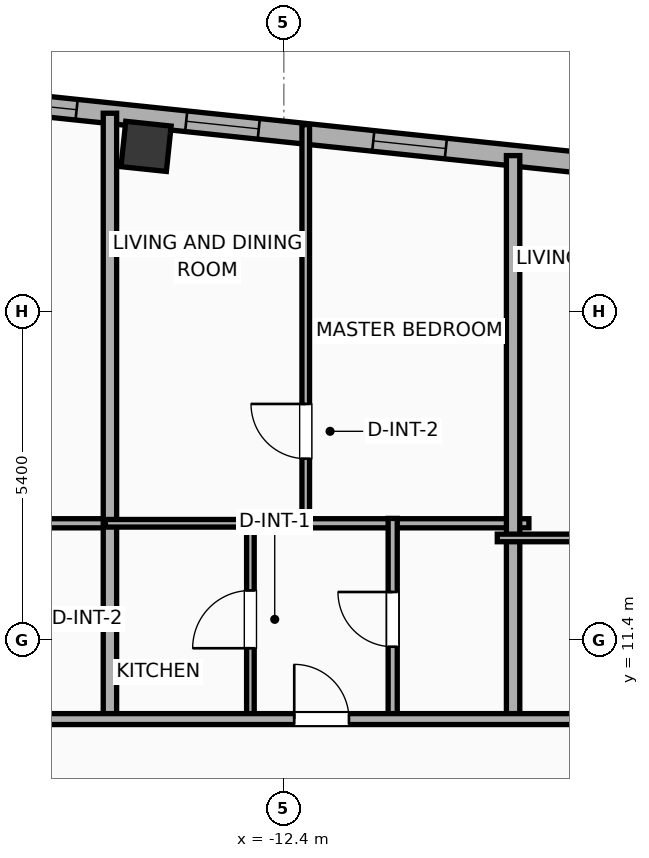
"""IFC4 building model, lengths in metres.
Left out: names, types, materials, properties, quantities, classifications, styles, units other than length and angle.
Written with IfcOpenShell. Run it as: python <this file> out.ifc"""

import sys

from ifc_helpers import new_model, si_unit, direction, frame, frame_2d, origin, origin_2d, place, context, subcontext, project, spatial, rectangle, hollow_rectangle, extrude, element, fill, save


model = new_model("IFC4")
c1 = context("Model", 3, precision=1e-05, world=origin(), true_north=direction((0.0, 1.0)))
c2 = subcontext(c1, "Body", "Model", "MODEL_VIEW")
j1 = project(units=[si_unit("LENGTHUNIT", "METRE"), si_unit("PLANEANGLEUNIT", "RADIAN")], contexts=[c1])
p1 = place(None, origin())
s1 = spatial("IfcSite", under=j1, at=p1, CompositionType="ELEMENT")
p2 = place(p1, origin())
s2 = spatial("IfcBuilding", under=s1, at=p2, CompositionType="ELEMENT")
p3 = place(p2, frame((0.0, 0.0, 271.7)))
s3 = spatial("IfcBuildingStorey", under=s2, at=p3, CompositionType="ELEMENT", Elevation=271.7)
p4 = place(p3, frame((-14.666, 19.518, 0.0), z_axis=(0.0, 0.0, 1.0), x_axis=(0.994521895368, -0.104528463268, 0.0)))
e1 = element("IfcColumn", 1, at=p4, inside=s3, PredefinedType="COLUMN", context=c2, shape_type="SweptSolid", body=[
    extrude(hollow_rectangle(XDim=0.75, YDim=0.75, WallThickness=0.025, at=origin_2d()), origin(), (0.0, 0.0, 1.0), 3.9),
])
p5 = place(p3, frame((-23.908, 20.972, 0.0), z_axis=(0.0, 0.0, 1.0), x_axis=(0.994521888554, -0.104528528102, 0.0)))
e2 = element("IfcWall", 2, at=p5, inside=s3, PredefinedType="ELEMENTEDWALL", context=c2, shape_type="SweptSolid", body=[
    extrude(rectangle(XDim=46.766, YDim=0.34, at=frame_2d((23.383, 0.0))), origin(), (0.0, 0.0, 1.0), 3.65),
])
p6 = place(p5, frame((5.744, 0.0, 0.75)))
e3 = element("IfcOpeningElement", 3, at=p6, cuts=e2, PredefinedType="OPENING", context=c2, shape_type="SweptSolid", body=[
    extrude(rectangle(XDim=2.4, YDim=2.1, at=frame_2d((1.2, 1.05))), frame((0.0, 0.18, 0.0), z_axis=(0.0, -1.0, 0.0), x_axis=(1.0, 0.0, 0.0)), (0.0, 0.0, 1.0), 0.36),
])
p7 = place(p5, frame((3.05, 0.0, 0.75)))
e4 = element("IfcOpeningElement", 4, at=p7, cuts=e2, PredefinedType="OPENING", context=c2, shape_type="SweptSolid", body=[
    extrude(rectangle(XDim=1.2, YDim=2.05, at=frame_2d((0.6, 1.025))), frame((0.0, 0.18, 0.0), z_axis=(0.0, -1.0, 0.0), x_axis=(1.0, 0.0, 0.0)), (0.0, 0.0, 1.0), 0.36),
])
p8 = place(p5, frame((9.957, 0.0, 0.75)))
e5 = element("IfcOpeningElement", 5, at=p8, cuts=e2, PredefinedType="OPENING", context=c2, shape_type="SweptSolid", body=[
    extrude(rectangle(XDim=1.2, YDim=2.05, at=frame_2d((0.6, 1.025))), frame((0.0, 0.18, 0.0), z_axis=(0.0, -1.0, 0.0), x_axis=(1.0, 0.0, 0.0)), (0.0, 0.0, 1.0), 0.36),
])
p9 = place(p5, frame((13.05, 0.0, 0.75)))
e6 = element("IfcOpeningElement", 6, at=p9, cuts=e2, PredefinedType="OPENING", context=c2, shape_type="SweptSolid", body=[
    extrude(rectangle(XDim=1.2, YDim=2.05, at=frame_2d((0.6, 1.025))), frame((0.0, 0.18, 0.0), z_axis=(0.0, -1.0, 0.0), x_axis=(1.0, 0.0, 0.0)), (0.0, 0.0, 1.0), 0.36),
])
p10 = place(p5, frame((16.383, 0.0, 0.75)))
e7 = element("IfcOpeningElement", 7, at=p10, cuts=e2, PredefinedType="OPENING", context=c2, shape_type="SweptSolid", body=[
    extrude(rectangle(XDim=1.2, YDim=2.05, at=frame_2d((0.6, 1.025))), frame((0.0, 0.18, 0.0), z_axis=(0.0, -1.0, 0.0), x_axis=(1.0, 0.0, 0.0)), (0.0, 0.0, 1.0), 0.36),
])
p11 = place(p5, frame((19.716, 0.0, 0.75)))
e8 = element("IfcOpeningElement", 8, at=p11, cuts=e2, PredefinedType="OPENING", context=c2, shape_type="SweptSolid", body=[
    extrude(rectangle(XDim=1.2, YDim=2.05, at=frame_2d((0.6, 1.025))), frame((0.0, 0.18, 0.0), z_axis=(0.0, -1.0, 0.0), x_axis=(1.0, 0.0, 0.0)), (0.0, 0.0, 1.0), 0.36),
])
p12 = place(p5, frame((23.195, 0.0, 0.75)))
e9 = element("IfcOpeningElement", 9, at=p12, cuts=e2, PredefinedType="OPENING", context=c2, shape_type="SweptSolid", body=[
    extrude(rectangle(XDim=1.2, YDim=2.05, at=frame_2d((0.6, 1.025))), frame((0.0, 0.18, 0.0), z_axis=(0.0, -1.0, 0.0), x_axis=(1.0, 0.0, 0.0)), (0.0, 0.0, 1.0), 0.36),
])
p13 = place(p5, frame((26.194, 0.0, 0.75)))
e10 = element("IfcOpeningElement", 10, at=p13, cuts=e2, PredefinedType="OPENING", context=c2, shape_type="SweptSolid", body=[
    extrude(rectangle(XDim=1.2, YDim=2.05, at=frame_2d((0.6, 1.025))), frame((0.0, 0.18, 0.0), z_axis=(0.0, -1.0, 0.0), x_axis=(1.0, 0.0, 0.0)), (0.0, 0.0, 1.0), 0.36),
])
p14 = place(p5, frame((30.152, 0.0, 0.75)))
e11 = element("IfcOpeningElement", 11, at=p14, cuts=e2, PredefinedType="OPENING", context=c2, shape_type="SweptSolid", body=[
    extrude(rectangle(XDim=1.2, YDim=2.05, at=frame_2d((0.6, 1.025))), frame((0.0, 0.18, 0.0), z_axis=(0.0, -1.0, 0.0), x_axis=(1.0, 0.0, 0.0)), (0.0, 0.0, 1.0), 0.36),
])
p15 = place(p5, frame((33.631, 0.0, 0.75)))
e12 = element("IfcOpeningElement", 12, at=p15, cuts=e2, PredefinedType="OPENING", context=c2, shape_type="SweptSolid", body=[
    extrude(rectangle(XDim=1.2, YDim=2.05, at=frame_2d((0.6, 1.025))), frame((0.0, 0.18, 0.0), z_axis=(0.0, -1.0, 0.0), x_axis=(1.0, 0.0, 0.0)), (0.0, 0.0, 1.0), 0.36),
])
p16 = place(p5, frame((38.07, 0.0, 0.75)))
e13 = element("IfcOpeningElement", 13, at=p16, cuts=e2, PredefinedType="OPENING", context=c2, shape_type="SweptSolid", body=[
    extrude(rectangle(XDim=1.2, YDim=2.05, at=frame_2d((0.6, 1.025))), frame((0.0, 0.18, 0.0), z_axis=(0.0, -1.0, 0.0), x_axis=(1.0, 0.0, 0.0)), (0.0, 0.0, 1.0), 0.36),
])
p17 = place(p5, frame((40.589, 0.0, 0.75)))
e14 = element("IfcOpeningElement", 14, at=p17, cuts=e2, PredefinedType="OPENING", context=c2, shape_type="SweptSolid", body=[
    extrude(rectangle(XDim=1.2, YDim=2.05, at=frame_2d((0.6, 1.025))), frame((0.0, 0.18, 0.0), z_axis=(0.0, -1.0, 0.0), x_axis=(1.0, 0.0, 0.0)), (0.0, 0.0, 1.0), 0.36),
])
p18 = place(p5, frame((43.789, 0.0, 0.75)))
e15 = element("IfcOpeningElement", 15, at=p18, cuts=e2, PredefinedType="OPENING", context=c2, shape_type="SweptSolid", body=[
    extrude(rectangle(XDim=1.2, YDim=2.05, at=frame_2d((0.6, 1.025))), frame((0.0, 0.18, 0.0), z_axis=(0.0, -1.0, 0.0), x_axis=(1.0, 0.0, 0.0)), (0.0, 0.0, 1.0), 0.36),
])
p19 = place(p3, frame((-18.79, 13.32, 0.0), z_axis=(0.0, 0.0, 1.0), x_axis=(1.0, 0.0, 0.0)))
e16 = element("IfcWall", 16, at=p19, inside=s3, PredefinedType="PLUMBINGWALL", context=c2, shape_type="SweptSolid", body=[
    extrude(rectangle(XDim=3.605, YDim=0.15, at=frame_2d((1.802, 0.0))), origin(), (0.0, 0.0, 1.0), 3.65),
])
p20 = place(p3, frame((-15.26, 10.02, 0.0), z_axis=(0.0, 0.0, 1.0), x_axis=(0.0, 1.0, 0.0)))
e17 = element("IfcWall", 17, at=p20, inside=s3, PredefinedType="PARTITIONING", context=c2, shape_type="SweptSolid", body=[
    extrude(rectangle(XDim=10.043, YDim=0.22, at=frame_2d((5.021, 0.0))), origin(), (0.0, 0.0, 1.0), 3.09),
])
p21 = place(p3, frame((-12.04, 13.24, 0.0), z_axis=(0.0, 0.0, 1.0), x_axis=(0.0, 1.0, 0.0)))
e18 = element("IfcWall", 18, at=p21, inside=s3, PredefinedType="PARTITIONING", context=c2, shape_type="SweptSolid", body=[
    extrude(rectangle(XDim=6.635, YDim=0.125, at=frame_2d((3.318, 0.0))), origin(), (0.0, 0.0, 1.0), 3.65),
])
p22 = place(p21, frame((1.143, 0.0, 0.0)))
e19 = element("IfcOpeningElement", 19, at=p22, cuts=e18, PredefinedType="OPENING", context=c2, shape_type="SweptSolid", body=[
    extrude(rectangle(XDim=0.9, YDim=2.05, at=frame_2d((0.45, 1.025))), frame((0.0, 0.073, 0.0), z_axis=(0.0, -1.0, 0.0), x_axis=(1.0, 0.0, 0.0)), (0.0, 0.0, 1.0), 0.145),
])
p23 = place(p3, frame((-12.16, 13.32, 0.0), z_axis=(0.0, 0.0, 1.0), x_axis=(1.0, 0.0, 0.0)))
e20 = element("IfcWall", 20, at=p23, inside=s3, PredefinedType="PLUMBINGWALL", context=c2, shape_type="SweptSolid", body=[
    extrude(rectangle(XDim=3.79, YDim=0.15, at=frame_2d((1.895, 0.0))), origin(), (0.0, 0.0, 1.0), 3.65),
])
p24 = place(p3, frame((-12.95, 10.08, 0.0), z_axis=(0.0, 0.0, 1.0), x_axis=(0.0, 1.0, 0.0)))
e21 = element("IfcWall", 21, at=p24, inside=s3, PredefinedType="PARTITIONING", context=c2, shape_type="SweptSolid", body=[
    extrude(rectangle(XDim=3.32, YDim=0.125, at=frame_2d((1.66, 0.0))), origin(), (0.0, 0.0, 1.0), 3.65),
])
p25 = place(p24, frame((1.185, 0.0, 0.0)))
e22 = element("IfcOpeningElement", 22, at=p25, cuts=e21, PredefinedType="OPENING", context=c2, shape_type="SweptSolid", body=[
    extrude(rectangle(XDim=0.95, YDim=2.05, at=frame_2d((0.475, 1.025))), frame((0.0, 0.073, 0.0), z_axis=(0.0, -1.0, 0.0), x_axis=(1.0, 0.0, 0.0)), (0.0, 0.0, 1.0), 0.145),
])
p26 = place(p3, frame((-15.335, 13.32, 0.0), z_axis=(0.0, 0.0, 1.0), x_axis=(1.0, 0.0, 0.0)))
e23 = element("IfcWall", 23, at=p26, inside=s3, PredefinedType="PARTITIONING", context=c2, shape_type="SweptSolid", body=[
    extrude(rectangle(XDim=2.505, YDim=0.125, at=frame_2d((1.252, 0.0))), origin(), (0.0, 0.0, 1.0), 3.65),
])
p27 = place(p3, frame((-10.61, 10.08, 0.0), z_axis=(0.0, 0.0, 1.0), x_axis=(0.0, 1.0, 0.0)))
e24 = element("IfcWall", 24, at=p27, inside=s3, PredefinedType="PLUMBINGWALL", context=c2, shape_type="SweptSolid", body=[
    extrude(rectangle(XDim=3.32, YDim=0.15, at=frame_2d((1.66, 0.0))), origin(), (0.0, 0.0, 1.0), 3.65),
])
p28 = place(p27, frame((1.21, 0.0, 0.0)))
e25 = element("IfcOpeningElement", 25, at=p28, cuts=e24, PredefinedType="OPENING", context=c2, shape_type="SweptSolid", body=[
    extrude(rectangle(XDim=0.9, YDim=2.05, at=frame_2d((0.45, 1.025))), frame((0.0, 0.085, 0.0), z_axis=(0.0, -1.0, 0.0), x_axis=(1.0, 0.0, 0.0)), (0.0, 0.0, 1.0), 0.17),
])
p29 = place(p3, frame((-8.63, 10.02, 0.0), z_axis=(0.0, 0.0, 1.0), x_axis=(0.0, 1.0, 0.0)))
e26 = element("IfcWall", 26, at=p29, inside=s3, PredefinedType="PARTITIONING", context=c2, shape_type="SweptSolid", body=[
    extrude(rectangle(XDim=9.346, YDim=0.22, at=frame_2d((4.673, 0.0))), origin(), (0.0, 0.0, 1.0), 3.65),
])
p30 = place(p3, frame((-8.89, 13.079, 0.0), z_axis=(0.0, 0.0, 1.0), x_axis=(1.0, 0.0, 0.0)))
e27 = element("IfcWall", 27, at=p30, inside=s3, PredefinedType="PARTITIONING", context=c2, shape_type="SweptSolid", body=[
    extrude(rectangle(XDim=2.69, YDim=0.125, at=frame_2d((1.345, 0.0))), origin(), (0.0, 0.0, 1.0), 3.65),
])
p31 = place(p3, frame((-28.516, 10.1, 0.0), z_axis=(0.0, 0.0, 1.0), x_axis=(1.0, 0.0, 0.0)))
e28 = element("IfcWall", 28, at=p31, inside=s3, PredefinedType="PARTITIONING", context=c2, shape_type="SweptSolid", body=[
    extrude(rectangle(XDim=53.955, YDim=0.18, at=frame_2d((26.978, 0.0))), origin(), (0.0, 0.0, 1.0), 3.65),
])
p32 = place(p31, frame((2.998, 0.0, 0.0)))
e29 = element("IfcOpeningElement", 29, at=p32, cuts=e28, PredefinedType="OPENING", context=c2, shape_type="SweptSolid", body=[
    extrude(rectangle(XDim=0.9, YDim=2.05, at=frame_2d((0.45, 1.025))), frame((0.0, 0.1, 0.0), z_axis=(0.0, -1.0, 0.0), x_axis=(1.0, 0.0, 0.0)), (0.0, 0.0, 1.0), 0.2),
])
p33 = place(p31, frame((9.656, 0.0, 0.0)))
e30 = element("IfcOpeningElement", 30, at=p33, cuts=e28, PredefinedType="OPENING", context=c2, shape_type="SweptSolid", body=[
    extrude(rectangle(XDim=0.9, YDim=2.05, at=frame_2d((0.45, 1.025))), frame((0.0, 0.1, 0.0), z_axis=(0.0, -1.0, 0.0), x_axis=(1.0, 0.0, 0.0)), (0.0, 0.0, 1.0), 0.2),
])
p34 = place(p31, frame((16.287, 0.0, 0.0)))
e31 = element("IfcOpeningElement", 31, at=p34, cuts=e28, PredefinedType="OPENING", context=c2, shape_type="SweptSolid", body=[
    extrude(rectangle(XDim=0.9, YDim=2.05, at=frame_2d((0.45, 1.025))), frame((0.0, 0.1, 0.0), z_axis=(0.0, -1.0, 0.0), x_axis=(1.0, 0.0, 0.0)), (0.0, 0.0, 1.0), 0.2),
])
p35 = place(p31, frame((22.918, 0.0, 0.0)))
e32 = element("IfcOpeningElement", 32, at=p35, cuts=e28, PredefinedType="OPENING", context=c2, shape_type="SweptSolid", body=[
    extrude(rectangle(XDim=0.9, YDim=2.05, at=frame_2d((0.45, 1.025))), frame((0.0, 0.1, 0.0), z_axis=(0.0, -1.0, 0.0), x_axis=(1.0, 0.0, 0.0)), (0.0, 0.0, 1.0), 0.2),
])
p36 = place(p31, frame((29.689, 0.0, 0.0)))
e33 = element("IfcOpeningElement", 33, at=p36, cuts=e28, PredefinedType="OPENING", context=c2, shape_type="SweptSolid", body=[
    extrude(rectangle(XDim=0.9, YDim=2.05, at=frame_2d((0.45, 1.025))), frame((0.0, 0.1, 0.0), z_axis=(0.0, -1.0, 0.0), x_axis=(1.0, 0.0, 0.0)), (0.0, 0.0, 1.0), 0.2),
])
p37 = place(p31, frame((36.612, 0.0, 0.0)))
e34 = element("IfcOpeningElement", 34, at=p37, cuts=e28, PredefinedType="OPENING", context=c2, shape_type="SweptSolid", body=[
    extrude(rectangle(XDim=0.9, YDim=2.05, at=frame_2d((0.45, 1.025))), frame((0.0, 0.1, 0.0), z_axis=(0.0, -1.0, 0.0), x_axis=(1.0, 0.0, 0.0)), (0.0, 0.0, 1.0), 0.2),
])
p38 = place(p31, frame((43.529, 0.0, 0.0)))
e35 = element("IfcOpeningElement", 35, at=p38, cuts=e28, PredefinedType="OPENING", context=c2, shape_type="SweptSolid", body=[
    extrude(rectangle(XDim=0.9, YDim=2.05, at=frame_2d((0.45, 1.025))), frame((0.0, 0.1, 0.0), z_axis=(0.0, -1.0, 0.0), x_axis=(1.0, 0.0, 0.0)), (0.0, 0.0, 1.0), 0.2),
])
p39 = place(p31, frame((50.452, 0.0, 0.0)))
e36 = element("IfcOpeningElement", 36, at=p39, cuts=e28, PredefinedType="OPENING", context=c2, shape_type="SweptSolid", body=[
    extrude(rectangle(XDim=0.9, YDim=2.05, at=frame_2d((0.45, 1.025))), frame((0.0, 0.1, 0.0), z_axis=(0.0, -1.0, 0.0), x_axis=(1.0, 0.0, 0.0)), (0.0, 0.0, 1.0), 0.2),
])
p40 = place(p6, origin())
e37 = element("IfcWindow", 37, at=p40, inside=s3, PartitioningType="SINGLE_PANEL", PredefinedType="WINDOW", context=c2, shape_type="SweptSolid", body=[
    extrude(rectangle(XDim=2.4, YDim=2.1, at=frame_2d((1.2, 1.05))), frame((0.0, 0.03, 0.0), z_axis=(0.0, -1.0, 0.0), x_axis=(1.0, 0.0, 0.0)), (0.0, 0.0, 1.0), 0.06),
])
fill(e3, e37)
p41 = place(p8, origin())
e38 = element("IfcWindow", 38, at=p41, inside=s3, PartitioningType="SINGLE_PANEL", PredefinedType="WINDOW", context=c2, shape_type="SweptSolid", body=[
    extrude(rectangle(XDim=1.2, YDim=2.05, at=frame_2d((0.6, 1.025))), frame((0.0, 0.03, 0.0), z_axis=(0.0, -1.0, 0.0), x_axis=(1.0, 0.0, 0.0)), (0.0, 0.0, 1.0), 0.06),
])
fill(e5, e38)
p42 = place(p9, origin())
e39 = element("IfcWindow", 39, at=p42, inside=s3, PartitioningType="SINGLE_PANEL", PredefinedType="WINDOW", context=c2, shape_type="SweptSolid", body=[
    extrude(rectangle(XDim=1.2, YDim=2.05, at=frame_2d((0.6, 1.025))), frame((0.0, 0.03, 0.0), z_axis=(0.0, -1.0, 0.0), x_axis=(1.0, 0.0, 0.0)), (0.0, 0.0, 1.0), 0.06),
])
fill(e6, e39)
p43 = place(p22, origin())
e40 = element("IfcDoor", 40, at=p43, inside=s3, OperationType="SINGLE_SWING_RIGHT", PredefinedType="DOOR", context=c2, shape_type="SweptSolid", body=[
    extrude(rectangle(XDim=0.9, YDim=2.05, at=frame_2d((0.45, 1.025))), frame((0.0, 0.025, 0.0), z_axis=(0.0, -1.0, 0.0), x_axis=(1.0, 0.0, 0.0)), (0.0, 0.0, 1.0), 0.05),
])
fill(e19, e40)
p44 = place(p25, origin())
e41 = element("IfcDoor", 41, at=p44, inside=s3, OperationType="SINGLE_SWING_LEFT", PredefinedType="DOOR", context=c2, shape_type="SweptSolid", body=[
    extrude(rectangle(XDim=0.95, YDim=2.05, at=frame_2d((0.475, 1.025))), frame((0.0, 0.025, 0.0), z_axis=(0.0, -1.0, 0.0), x_axis=(1.0, 0.0, 0.0)), (0.0, 0.0, 1.0), 0.05),
])
fill(e22, e41)
p45 = place(p28, origin())
e42 = element("IfcDoor", 42, at=p45, inside=s3, OperationType="SINGLE_SWING_RIGHT", PredefinedType="DOOR", context=c2, shape_type="SweptSolid", body=[
    extrude(rectangle(XDim=0.9, YDim=2.05, at=frame_2d((0.45, 1.025))), frame((0.0, 0.025, 0.0), z_axis=(0.0, -1.0, 0.0), x_axis=(1.0, 0.0, 0.0)), (0.0, 0.0, 1.0), 0.05),
])
fill(e25, e42)
p46 = place(p34, origin())
e43 = element("IfcDoor", 43, at=p46, inside=s3, OperationType="SINGLE_SWING_LEFT", PredefinedType="DOOR", context=c2, shape_type="SweptSolid", body=[
    extrude(rectangle(XDim=0.9, YDim=2.05, at=frame_2d((0.45, 1.025))), frame((0.0, 0.025, 0.0), z_axis=(0.0, -1.0, 0.0), x_axis=(1.0, 0.0, 0.0)), (0.0, 0.0, 1.0), 0.05),
])
fill(e31, e43)
save(model, sys.argv[1])
